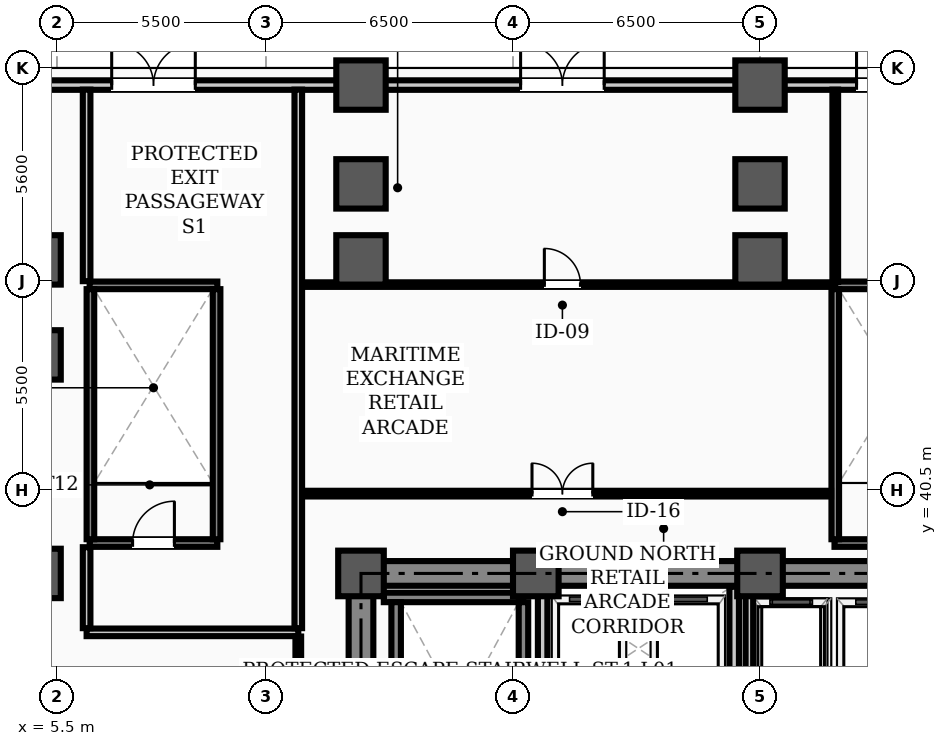
"""IFC4 building model, lengths in metres.
Left out: names, types, materials, properties, quantities, classifications, styles, units other than length and angle.
Written with IfcOpenShell. Run it as: python <this file> out.ifc"""

import sys

from ifc_helpers import new_model, si_unit, direction, frame, frame_2d, origin, origin_2d, place, context, subcontext, project, spatial, rectangle, hollow_rectangle, extrude, element, fill, save


model = new_model("IFC4")
c1 = context("Model", 3, precision=1e-05, world=origin(), true_north=direction((0.0, 1.0)))
c2 = subcontext(c1, "Body", "Model", "MODEL_VIEW")
j1 = project(units=[si_unit("LENGTHUNIT", "METRE"), si_unit("PLANEANGLEUNIT", "RADIAN")], contexts=[c1])
p1 = place(None, origin())
s1 = spatial("IfcSite", under=j1, at=p1, CompositionType="ELEMENT")
p2 = place(p1, origin())
s2 = spatial("IfcBuilding", under=s1, at=p2, CompositionType="ELEMENT")
p3 = place(p2, origin())
s3 = spatial("IfcBuildingStorey", under=s2, at=p3, CompositionType="ELEMENT", Elevation=0.0)
for number, where, z_axis, x_axis in (
    (1, (13.5, 38.3, 0.0), (0.0, 0.0, 1.0), (1.0, 0.0, 0.0)),
    (2, (18.1, 38.3, 0.0), (0.0, 0.0, 1.0), (1.0, 0.0, 0.0)),
    (3, (24.0, 38.3, 0.0), (0.0, 0.0, 1.0), (1.0, 0.0, 0.0)),
):
    element("IfcColumn", number, at=place(p3, frame(where, z_axis=z_axis, x_axis=x_axis)), inside=s3, PredefinedType="COLUMN", context=c2, shape_type="SweptSolid", body=[
        extrude(hollow_rectangle(XDim=1.2, YDim=1.2, WallThickness=0.04, InnerFilletRadius=0.02, OuterFilletRadius=0.06, at=origin_2d()), origin(), (0.0, 0.0, 1.0), 5.8),
    ])
for number, where, z_axis, x_axis in (
    (4, (4.95, 38.3, 0.0), (0.0, 0.0, 1.0), (1.0, 0.0, 0.0)),
    (5, (4.95, 44.05, 0.0), (0.0, 0.0, 1.0), (1.0, 0.0, 0.0)),
    (6, (4.95, 46.55, 0.0), (0.0, 0.0, 1.0), (1.0, 0.0, 0.0)),
    (7, (13.5, 46.55, 0.0), (0.0, 0.0, 1.0), (1.0, 0.0, 0.0)),
    (8, (13.5, 48.55, 0.0), (0.0, 0.0, 1.0), (1.0, 0.0, 0.0)),
    (9, (13.5, 51.15, 0.0), (0.0, 0.0, 1.0), (1.0, 0.0, 0.0)),
    (10, (24.0, 46.55, 0.0), (0.0, 0.0, 1.0), (1.0, 0.0, 0.0)),
    (11, (24.0, 48.55, 0.0), (0.0, 0.0, 1.0), (1.0, 0.0, 0.0)),
    (12, (24.0, 51.15, 0.0), (0.0, 0.0, 1.0), (1.0, 0.0, 0.0)),
):
    element("IfcColumn", number, at=place(p3, frame(where, z_axis=z_axis, x_axis=x_axis)), inside=s3, PredefinedType="COLUMN", context=c2, shape_type="SweptSolid", body=[
        extrude(rectangle(XDim=1.3, YDim=1.3, at=origin_2d()), origin(), (0.0, 0.0, 1.0), 5.8),
    ])
p4 = place(p3, frame((0.45, 51.15, 0.0), z_axis=(0.0, 0.0, 1.0), x_axis=(1.0, 0.0, 0.0)))
e13 = element("IfcWall", 13, at=p4, inside=s3, PredefinedType="STANDARD", context=c2, shape_type="SweptSolid", body=[
    extrude(rectangle(XDim=58.97, YDim=0.25, at=frame_2d((29.485, 0.0))), origin(), (0.0, 0.0, 1.0), 4.75),
])
p5 = place(p4, frame((6.49, 0.0, 0.0)))
e14 = element("IfcOpeningElement", 14, at=p5, cuts=e13, PredefinedType="OPENING", context=c2, shape_type="SweptSolid", body=[
    extrude(rectangle(XDim=2.2, YDim=2.4, at=frame_2d((1.1, 1.2))), frame((0.0, 0.135, 0.0), z_axis=(0.0, -1.0, 0.0), x_axis=(1.0, 0.0, 0.0)), (0.0, 0.0, 1.0), 0.27),
])
p6 = place(p4, frame((17.25, 0.0, 0.0)))
e15 = element("IfcOpeningElement", 15, at=p6, cuts=e13, PredefinedType="OPENING", context=c2, shape_type="SweptSolid", body=[
    extrude(rectangle(XDim=2.2, YDim=2.4, at=frame_2d((1.1, 1.2))), frame((0.0, 0.135, 0.0), z_axis=(0.0, -1.0, 0.0), x_axis=(1.0, 0.0, 0.0)), (0.0, 0.0, 1.0), 0.27),
])
p7 = place(p4, frame((26.09, 0.0, 0.0)))
e16 = element("IfcOpeningElement", 16, at=p7, cuts=e13, PredefinedType="OPENING", context=c2, shape_type="SweptSolid", body=[
    extrude(rectangle(XDim=2.2, YDim=2.4, at=frame_2d((1.1, 1.2))), frame((0.0, 0.135, 0.0), z_axis=(0.0, -1.0, 0.0), x_axis=(1.0, 0.0, 0.0)), (0.0, 0.0, 1.0), 0.27),
])
p8 = place(p4, frame((39.35, 0.0, 0.0)))
e17 = element("IfcOpeningElement", 17, at=p8, cuts=e13, PredefinedType="OPENING", context=c2, shape_type="SweptSolid", body=[
    extrude(rectangle(XDim=2.2, YDim=2.4, at=frame_2d((1.1, 1.2))), frame((0.0, 0.135, 0.0), z_axis=(0.0, -1.0, 0.0), x_axis=(1.0, 0.0, 0.0)), (0.0, 0.0, 1.0), 0.27),
])
p9 = place(p4, frame((33.0, 0.0, 1.05)))
e18 = element("IfcOpeningElement", 18, at=p9, cuts=e13, PredefinedType="OPENING", context=c2, shape_type="SweptSolid", body=[
    extrude(rectangle(XDim=1.6, YDim=1.5, at=frame_2d((0.8, 0.75))), frame((0.0, 0.135, 0.0), z_axis=(0.0, -1.0, 0.0), x_axis=(1.0, 0.0, 0.0)), (0.0, 0.0, 1.0), 0.27),
])
p10 = place(p3, frame((13.5, 38.3, 0.0), z_axis=(0.0, 0.0, 1.0), x_axis=(1.0, 0.0, 0.0)))
e19 = element("IfcWall", 19, at=p10, inside=s3, PredefinedType="SHEAR", context=c2, shape_type="SweptSolid", body=[
    extrude(rectangle(XDim=30.5, YDim=0.65, at=frame_2d((15.25, 0.0))), origin(), (0.0, 0.0, 1.0), 5.55),
])
p11 = place(p3, frame((13.5, 29.35, 0.0), z_axis=(0.0, 0.0, 1.0), x_axis=(0.0, 1.0, 0.0)))
e20 = element("IfcWall", 20, at=p11, inside=s3, PredefinedType="SHEAR", context=c2, shape_type="SweptSolid", body=[
    extrude(rectangle(XDim=8.6, YDim=0.65, at=frame_2d((4.3, 0.0))), origin(), (0.0, 0.0, 1.0), 5.55),
])
p12 = place(p3, frame((14.1, 37.669, 0.0), z_axis=(0.0, 0.0, 1.0), x_axis=(1.0, 0.0, 0.0)))
e21 = element("IfcWall", 21, at=p12, inside=s3, PredefinedType="STANDARD", context=c2, shape_type="SweptSolid", body=[
    extrude(rectangle(XDim=3.67, YDim=0.25, at=frame_2d((1.835, 0.0))), origin(), (0.0, 0.0, 1.0), 5.55),
])
for number, where, z_axis, x_axis in (
    (22, (14.425, 30.36, 0.0), (0.0, 0.0, 1.0), (0.0, 1.0, 0.0)),
    (23, (17.775, 30.36, 0.0), (0.0, 0.0, 1.0), (0.0, 1.0, 0.0)),
):
    element("IfcWall", number, at=place(p3, frame(where, z_axis=z_axis, x_axis=x_axis)), inside=s3, PredefinedType="STANDARD", context=c2, shape_type="SweptSolid", body=[
        extrude(rectangle(XDim=7.184, YDim=0.25, at=frame_2d((3.592, 0.0))), origin(), (0.0, 0.0, 1.0), 5.55),
    ])
for number, where, z_axis, x_axis in (
    (24, (18.28, 34.62, 0.0), (0.0, 0.0, 1.0), (0.0, 1.0, 0.0)),
    (25, (23.32, 34.62, 0.0), (0.0, 0.0, 1.0), (0.0, 1.0, 0.0)),
):
    element("IfcWall", number, at=place(p3, frame(where, z_axis=z_axis, x_axis=x_axis)), inside=s3, PredefinedType="STANDARD", context=c2, shape_type="SweptSolid", body=[
        extrude(rectangle(XDim=3.33, YDim=0.25, at=frame_2d((1.665, 0.0))), origin(), (0.0, 0.0, 1.0), 4.73),
    ])
p13 = place(p3, frame((6.36, 39.1, 0.0), z_axis=(0.0, 0.0, 1.0), x_axis=(1.0, 0.0, 0.0)))
e26 = element("IfcWall", 26, at=p13, inside=s3, PredefinedType="STANDARD", context=c2, shape_type="SweptSolid", body=[
    extrude(rectangle(XDim=3.36, YDim=0.2, at=frame_2d((1.68, 0.0))), origin(), (0.0, 0.0, 1.0), 5.55),
])
p14 = place(p13, frame((1.13, 0.0, 0.0)))
e27 = element("IfcOpeningElement", 27, at=p14, cuts=e26, PredefinedType="OPENING", context=c2, shape_type="SweptSolid", body=[
    extrude(rectangle(XDim=1.1, YDim=2.08, at=frame_2d((0.55, 1.04))), frame((0.0, 0.11, 0.0), z_axis=(0.0, -1.0, 0.0), x_axis=(1.0, 0.0, 0.0)), (0.0, 0.0, 1.0), 0.22),
])
p15 = place(p3, frame((6.36, 45.88, 0.0), z_axis=(0.0, 0.0, 1.0), x_axis=(1.0, 0.0, 0.0)))
e28 = element("IfcWall", 28, at=p15, inside=s3, PredefinedType="STANDARD", context=c2, shape_type="SweptSolid", body=[
    extrude(rectangle(XDim=3.36, YDim=0.2, at=frame_2d((1.68, 0.0))), origin(), (0.0, 0.0, 1.0), 5.55),
])
for number, where, z_axis, x_axis in (
    (29, (6.38, 39.2, 0.0), (0.0, 0.0, 1.0), (0.0, 1.0, 0.0)),
    (30, (9.7, 39.2, 0.0), (0.0, 0.0, 1.0), (0.0, 1.0, 0.0)),
):
    element("IfcWall", number, at=place(p3, frame(where, z_axis=z_axis, x_axis=x_axis)), inside=s3, PredefinedType="STANDARD", context=c2, shape_type="SweptSolid", body=[
        extrude(rectangle(XDim=6.58, YDim=0.2, at=frame_2d((3.29, 0.0))), origin(), (0.0, 0.0, 1.0), 5.55),
    ])
p16 = place(p3, frame((25.96, 39.1, 0.0), z_axis=(0.0, 0.0, 1.0), x_axis=(1.0, 0.0, 0.0)))
e31 = element("IfcWall", 31, at=p16, inside=s3, PredefinedType="STANDARD", context=c2, shape_type="SweptSolid", body=[
    extrude(rectangle(XDim=3.36, YDim=0.2, at=frame_2d((1.68, 0.0))), origin(), (0.0, 0.0, 1.0), 5.55),
])
p17 = place(p16, frame((1.13, 0.0, 0.0)))
e32 = element("IfcOpeningElement", 32, at=p17, cuts=e31, PredefinedType="OPENING", context=c2, shape_type="SweptSolid", body=[
    extrude(rectangle(XDim=1.1, YDim=2.08, at=frame_2d((0.55, 1.04))), frame((0.0, 0.11, 0.0), z_axis=(0.0, -1.0, 0.0), x_axis=(1.0, 0.0, 0.0)), (0.0, 0.0, 1.0), 0.22),
])
p18 = place(p3, frame((25.96, 45.88, 0.0), z_axis=(0.0, 0.0, 1.0), x_axis=(1.0, 0.0, 0.0)))
e33 = element("IfcWall", 33, at=p18, inside=s3, PredefinedType="STANDARD", context=c2, shape_type="SweptSolid", body=[
    extrude(rectangle(XDim=3.36, YDim=0.2, at=frame_2d((1.68, 0.0))), origin(), (0.0, 0.0, 1.0), 5.55),
])
p19 = place(p3, frame((25.98, 39.2, 0.0), z_axis=(0.0, 0.0, 1.0), x_axis=(0.0, 1.0, 0.0)))
e34 = element("IfcWall", 34, at=p19, inside=s3, PredefinedType="STANDARD", context=c2, shape_type="SweptSolid", body=[
    extrude(rectangle(XDim=6.58, YDim=0.2, at=frame_2d((3.29, 0.0))), origin(), (0.0, 0.0, 1.0), 5.55),
])
p20 = place(p3, frame((6.28, 36.75, 0.0), z_axis=(0.0, 0.0, 1.0), x_axis=(1.0, 0.0, 0.0)))
e35 = element("IfcWall", 35, at=p20, inside=s3, PredefinedType="STANDARD", context=c2, shape_type="SweptSolid", body=[
    extrude(rectangle(XDim=5.57, YDim=0.2, at=frame_2d((2.785, 0.0))), origin(), (0.0, 0.0, 1.0), 5.08),
])
p21 = place(p3, frame((11.85, 45.9, 0.0), z_axis=(0.0, 0.0, 1.0), x_axis=(1.0, 0.0, 0.0)))
e36 = element("IfcWall", 36, at=p21, inside=s3, PredefinedType="PARTITIONING", context=c2, shape_type="SweptSolid", body=[
    extrude(rectangle(XDim=14.13, YDim=0.12, at=frame_2d((7.065, 0.0))), origin(), (0.0, 0.0, 1.0), 4.83),
])
p22 = place(p21, frame((6.475, 0.0, 0.0)))
e37 = element("IfcOpeningElement", 37, at=p22, cuts=e36, PredefinedType="OPENING", context=c2, shape_type="SweptSolid", body=[
    extrude(rectangle(XDim=0.95, YDim=2.08, at=frame_2d((0.475, 1.04))), frame((0.0, 0.07, 0.0), z_axis=(0.0, -1.0, 0.0), x_axis=(1.0, 0.0, 0.0)), (0.0, 0.0, 1.0), 0.14),
])
p23 = place(p3, frame((11.85, 40.4, 0.0), z_axis=(0.0, 0.0, 1.0), x_axis=(1.0, 0.0, 0.0)))
e38 = element("IfcWall", 38, at=p23, inside=s3, PredefinedType="PARTITIONING", context=c2, shape_type="SweptSolid", body=[
    extrude(rectangle(XDim=14.02, YDim=0.15, at=frame_2d((7.01, 0.0))), origin(), (0.0, 0.0, 1.0), 4.83),
])
p24 = place(p23, frame((6.15, 0.0, 0.0)))
e39 = element("IfcOpeningElement", 39, at=p24, cuts=e38, PredefinedType="OPENING", context=c2, shape_type="SweptSolid", body=[
    extrude(rectangle(XDim=1.6, YDim=2.08, at=frame_2d((0.8, 1.04))), frame((0.0, 0.085, 0.0), z_axis=(0.0, -1.0, 0.0), x_axis=(1.0, 0.0, 0.0)), (0.0, 0.0, 1.0), 0.17),
])
p25 = place(p3, frame((6.28, 36.86, 0.0), z_axis=(0.0, 0.0, 1.0), x_axis=(0.0, 1.0, 0.0)))
e40 = element("IfcWall", 40, at=p25, inside=s3, PredefinedType="STANDARD", context=c2, shape_type="SweptSolid", body=[
    extrude(rectangle(XDim=2.13, YDim=0.2, at=frame_2d((1.065, 0.0))), origin(), (0.0, 0.0, 1.0), 4.73),
])
p26 = place(p3, frame((6.28, 45.99, 0.0), z_axis=(0.0, 0.0, 1.0), x_axis=(0.0, 1.0, 0.0)))
e41 = element("IfcWall", 41, at=p26, inside=s3, PredefinedType="STANDARD", context=c2, shape_type="SweptSolid", body=[
    extrude(rectangle(XDim=5.04, YDim=0.2, at=frame_2d((2.52, 0.0))), origin(), (0.0, 0.0, 1.0), 4.73),
])
p27 = place(p3, frame((11.85, 36.86, 0.0), z_axis=(0.0, 0.0, 1.0), x_axis=(0.0, 1.0, 0.0)))
e42 = element("IfcWall", 42, at=p27, inside=s3, PredefinedType="STANDARD", context=c2, shape_type="SweptSolid", body=[
    extrude(rectangle(XDim=14.17, YDim=0.2, at=frame_2d((7.085, 0.0))), origin(), (0.0, 0.0, 1.0), 4.73),
])
p28 = place(p3, frame((25.98, 45.97, 0.0), z_axis=(0.0, 0.0, 1.0), x_axis=(0.0, 1.0, 0.0)))
e43 = element("IfcWall", 43, at=p28, inside=s3, PredefinedType="PARTITIONING", context=c2, shape_type="SweptSolid", body=[
    extrude(rectangle(XDim=5.06, YDim=0.15, at=frame_2d((2.53, 0.0))), origin(), (0.0, 0.0, 1.0), 4.73),
])
p29 = place(p3, frame((11.85, 28.15, 0.0), z_axis=(0.0, 0.0, 1.0), x_axis=(0.0, 1.0, 0.0)))
e44 = element("IfcWall", 44, at=p29, inside=s3, PredefinedType="PARTITIONING", context=c2, shape_type="SweptSolid", body=[
    extrude(rectangle(XDim=8.49, YDim=0.15, at=frame_2d((4.245, 0.0))), origin(), (0.0, 0.0, 1.0), 4.73),
])
p30 = place(p3, frame((23.72, 34.9, 0.0), z_axis=(0.0, 0.0, 1.0), x_axis=(0.0, 1.0, 0.0)))
e45 = element("IfcWall", 45, at=p30, inside=s3, PredefinedType="STANDARD", context=c2, shape_type="SweptSolid", body=[
    extrude(rectangle(XDim=3.12, YDim=0.2, at=frame_2d((1.56, 0.0))), origin(), (0.0, 0.0, 1.0), 4.73),
])
p31 = place(p5, origin())
e46 = element("IfcDoor", 46, at=p31, inside=s3, OperationType="DOUBLE_DOOR_SINGLE_SWING", PredefinedType="DOOR", context=c2, shape_type="SweptSolid", body=[
    extrude(rectangle(XDim=2.2, YDim=2.4, at=frame_2d((1.1, 1.2))), frame((0.0, 0.025, 0.0), z_axis=(0.0, -1.0, 0.0), x_axis=(1.0, 0.0, 0.0)), (0.0, 0.0, 1.0), 0.05),
])
fill(e14, e46)
p32 = place(p6, origin())
e47 = element("IfcDoor", 47, at=p32, inside=s3, OperationType="DOUBLE_DOOR_SINGLE_SWING", PredefinedType="DOOR", context=c2, shape_type="SweptSolid", body=[
    extrude(rectangle(XDim=2.2, YDim=2.4, at=frame_2d((1.1, 1.2))), frame((0.0, 0.025, 0.0), z_axis=(0.0, -1.0, 0.0), x_axis=(1.0, 0.0, 0.0)), (0.0, 0.0, 1.0), 0.05),
])
fill(e15, e47)
p33 = place(p7, origin())
e48 = element("IfcDoor", 48, at=p33, inside=s3, OperationType="DOUBLE_DOOR_SINGLE_SWING", PredefinedType="DOOR", context=c2, shape_type="SweptSolid", body=[
    extrude(rectangle(XDim=2.2, YDim=2.4, at=frame_2d((1.1, 1.2))), frame((0.0, 0.025, 0.0), z_axis=(0.0, -1.0, 0.0), x_axis=(1.0, 0.0, 0.0)), (0.0, 0.0, 1.0), 0.05),
])
fill(e16, e48)
p34 = place(p14, origin())
e49 = element("IfcDoor", 49, at=p34, inside=s3, OperationType="SINGLE_SWING_RIGHT", PredefinedType="DOOR", context=c2, shape_type="SweptSolid", body=[
    extrude(rectangle(XDim=1.1, YDim=2.08, at=frame_2d((0.55, 1.04))), frame((0.0, 0.025, 0.0), z_axis=(0.0, -1.0, 0.0), x_axis=(1.0, 0.0, 0.0)), (0.0, 0.0, 1.0), 0.05),
])
fill(e27, e49)
p35 = place(p24, origin())
e50 = element("IfcDoor", 50, at=p35, inside=s3, OperationType="DOUBLE_DOOR_SINGLE_SWING", PredefinedType="DOOR", context=c2, shape_type="SweptSolid", body=[
    extrude(rectangle(XDim=1.6, YDim=2.08, at=frame_2d((0.8, 1.04))), frame((0.0, 0.025, 0.0), z_axis=(0.0, -1.0, 0.0), x_axis=(1.0, 0.0, 0.0)), (0.0, 0.0, 1.0), 0.05),
])
fill(e39, e50)
p36 = place(p22, origin())
e51 = element("IfcDoor", 51, at=p36, inside=s3, OperationType="SINGLE_SWING_LEFT", PredefinedType="DOOR", context=c2, shape_type="SweptSolid", body=[
    extrude(rectangle(XDim=0.95, YDim=2.08, at=frame_2d((0.475, 1.04))), frame((0.0, 0.025, 0.0), z_axis=(0.0, -1.0, 0.0), x_axis=(1.0, 0.0, 0.0)), (0.0, 0.0, 1.0), 0.05),
])
fill(e37, e51)
save(model, sys.argv[1])
